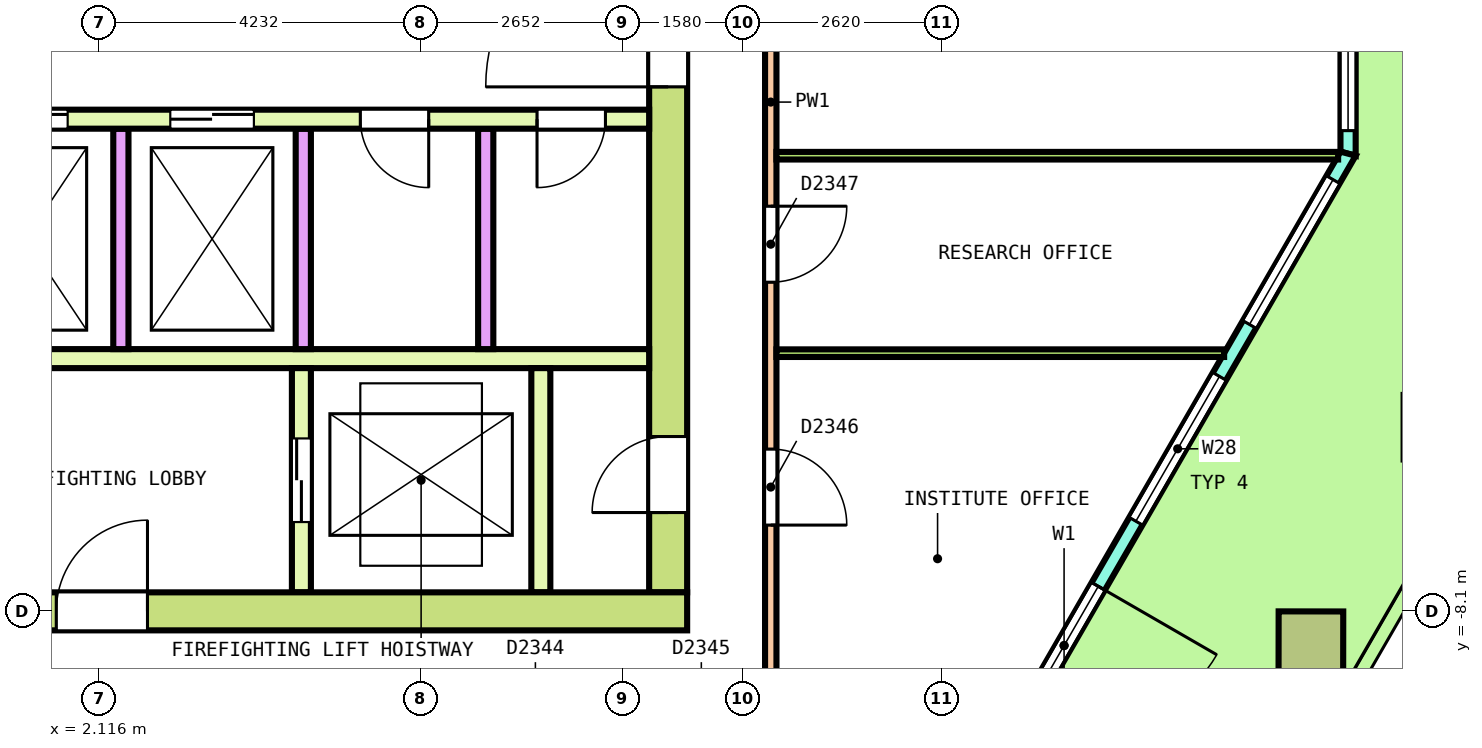
"""IFC4 building model, lengths in metres.
Left out: names, types, materials, properties, quantities, classifications, styles, units other than length and angle.
Written with IfcOpenShell. Run it as: python <this file> out.ifc"""

import sys

from ifc_helpers import new_model, si_unit, direction, frame, frame_2d, origin, origin_2d, place, context, subcontext, project, spatial, polyline, rectangle, outline, extrude, element, fill, save


model = new_model("IFC4")
c1 = context("Model", 3, precision=1e-05, world=origin(), true_north=direction((0.0, 1.0)))
c2 = subcontext(c1, "Body", "Model", "MODEL_VIEW")
j1 = project(units=[si_unit("LENGTHUNIT", "METRE"), si_unit("PLANEANGLEUNIT", "RADIAN")], contexts=[c1])
p1 = place(None, origin())
s1 = spatial("IfcSite", under=j1, at=p1, CompositionType="ELEMENT")
p2 = place(p1, origin())
s2 = spatial("IfcBuilding", under=s1, at=p2, CompositionType="ELEMENT")
p3 = place(p2, frame((0.0, 0.0, 320.6)))
s3 = spatial("IfcBuildingStorey", under=s2, at=p3, CompositionType="ELEMENT", Elevation=320.6)
p4 = place(p3, frame((18.056, -8.526, 0.0), z_axis=(0.003611943648, 0.006354345307, 0.999973287723), x_axis=(0.495427452012, 0.86861856765, -0.007309153601)))
e1 = element("IfcColumn", 1, at=p4, inside=s3, PredefinedType="COLUMN", context=c2, shape_type="SweptSolid", body=[
    extrude(rectangle(XDim=0.85, YDim=0.85, at=origin_2d()), origin(), (0.0, 0.0, 1.0), 3.65),
])
p5 = place(p3, frame((19.701, -5.677, 0.0), z_axis=(0.010900409442, 0.01892525075, 0.999761479533), x_axis=(0.49889855577, 0.866385160892, -0.021839964222)))
e2 = element("IfcColumn", 2, at=p5, inside=s3, PredefinedType="COLUMN", context=c2, shape_type="SweptSolid", body=[
    extrude(rectangle(XDim=0.85, YDim=0.85, at=origin_2d()), origin(), (0.0, 0.0, 1.0), 3.651),
])
p6 = place(p3, frame((18.545, -2.079, 0.0), z_axis=(0.0, 0.0, 1.0), x_axis=(0.0, 1.0, 0.0)))
e3 = element("IfcWall", 3, at=p6, inside=s3, PredefinedType="SOLIDWALL", context=c2, shape_type="SweptSolid", body=[
    extrude(outline(polyline([(-0.027, -0.1), (1.214, -0.1), (2.456, -0.1), (3.697, -0.1), (4.938, -0.1), (4.885, 0.1), (3.67, 0.1), (2.456, 0.1), (1.241, 0.1), (0.027, 0.1), (-0.027, -0.1)])), origin(), (0.0, 0.0, 1.0), 3.7),
])
p7 = place(p6, frame((0.303, 0.0, 0.1)))
e4 = element("IfcOpeningElement", 4, at=p7, cuts=e3, PredefinedType="OPENING", context=c2, shape_type="SweptSolid", body=[
    extrude(rectangle(XDim=1.85, YDim=2.9, at=frame_2d((0.925, 1.45))), frame((0.0, 0.11, 0.0), z_axis=(0.0, -1.0, 0.0), x_axis=(1.0, 0.0, 0.0)), (0.0, 0.0, 1.0), 0.22),
])
p8 = place(p6, frame((2.759, 0.0, 0.1)))
e5 = element("IfcOpeningElement", 5, at=p8, cuts=e3, PredefinedType="OPENING", context=c2, shape_type="SweptSolid", body=[
    extrude(rectangle(XDim=1.85, YDim=2.9, at=frame_2d((0.925, 1.45))), frame((0.0, 0.11, 0.0), z_axis=(0.0, -1.0, 0.0), x_axis=(1.0, 0.0, 0.0)), (0.0, 0.0, 1.0), 0.22),
])
p9 = place(p3, frame((11.073, -15.021, 0.0), z_axis=(0.0, 0.0, 1.0), x_axis=(0.499999144553, 0.866025897676, 0.0)))
e6 = element("IfcWall", 6, at=p9, inside=s3, PredefinedType="SOLIDWALL", context=c2, shape_type="SweptSolid", body=[
    extrude(outline(polyline([(-0.027, -0.1), (1.044, -0.1), (2.116, -0.1), (3.187, -0.1), (4.259, -0.1), (5.33, -0.1), (6.401, -0.1), (7.472, -0.1), (8.544, -0.1), (9.615, -0.1), (10.686, -0.1), (11.758, -0.1), (12.829, -0.1), (13.9, -0.1), (14.972, -0.1), (14.918, 0.1), (13.854, 0.1), (12.791, 0.1), (11.727, 0.1), (10.663, 0.1), (9.6, 0.1), (8.536, 0.1), (7.472, 0.1), (6.409, 0.1), (5.345, 0.1), (4.281, 0.1), (3.218, 0.1), (2.154, 0.1), (1.091, 0.1), (0.027, 0.1), (-0.027, -0.1)])), origin(), (0.0, 0.0, 1.0), 3.7),
])
p10 = place(p9, frame((0.395, 0.0, 0.1)))
e7 = element("IfcOpeningElement", 7, at=p10, cuts=e6, PredefinedType="OPENING", context=c2, shape_type="SweptSolid", body=[
    extrude(rectangle(XDim=2.2, YDim=2.9, at=frame_2d((1.1, 1.45))), frame((0.0, 0.11, 0.0), z_axis=(0.0, -1.0, 0.0), x_axis=(1.0, 0.0, 0.0)), (0.0, 0.0, 1.0), 0.22),
])
p11 = place(p9, frame((3.384, 0.0, 0.1)))
e8 = element("IfcOpeningElement", 8, at=p11, cuts=e6, PredefinedType="OPENING", context=c2, shape_type="SweptSolid", body=[
    extrude(rectangle(XDim=2.2, YDim=2.9, at=frame_2d((1.1, 1.45))), frame((0.0, 0.11, 0.0), z_axis=(0.0, -1.0, 0.0), x_axis=(1.0, 0.0, 0.0)), (0.0, 0.0, 1.0), 0.22),
])
p12 = place(p9, frame((6.573, 0.0, 0.0)))
e9 = element("IfcOpeningElement", 9, at=p12, cuts=e6, PredefinedType="OPENING", context=c2, shape_type="SweptSolid", body=[
    extrude(rectangle(XDim=1.8, YDim=2.4, at=frame_2d((0.9, 1.2))), frame((0.0, 0.11, 0.0), z_axis=(0.0, -1.0, 0.0), x_axis=(1.0, 0.0, 0.0)), (0.0, 0.0, 1.0), 0.22),
])
p13 = place(p9, frame((6.573, 0.0, 2.55)))
e10 = element("IfcOpeningElement", 10, at=p13, cuts=e6, PredefinedType="OPENING", context=c2, shape_type="SweptSolid", body=[
    extrude(rectangle(XDim=1.8, YDim=0.45, at=frame_2d((0.9, 0.225))), frame((0.0, 0.11, 0.0), z_axis=(0.0, -1.0, 0.0), x_axis=(1.0, 0.0, 0.0)), (0.0, 0.0, 1.0), 0.22),
])
p14 = place(p9, frame((9.361, 0.0, 0.1)))
e11 = element("IfcOpeningElement", 11, at=p14, cuts=e6, PredefinedType="OPENING", context=c2, shape_type="SweptSolid", body=[
    extrude(rectangle(XDim=2.2, YDim=2.9, at=frame_2d((1.1, 1.45))), frame((0.0, 0.11, 0.0), z_axis=(0.0, -1.0, 0.0), x_axis=(1.0, 0.0, 0.0)), (0.0, 0.0, 1.0), 0.22),
])
p15 = place(p9, frame((12.35, 0.0, 0.1)))
e12 = element("IfcOpeningElement", 12, at=p15, cuts=e6, PredefinedType="OPENING", context=c2, shape_type="SweptSolid", body=[
    extrude(rectangle(XDim=2.2, YDim=2.9, at=frame_2d((1.1, 1.45))), frame((0.0, 0.11, 0.0), z_axis=(0.0, -1.0, 0.0), x_axis=(1.0, 0.0, 0.0)), (0.0, 0.0, 1.0), 0.22),
])
p16 = place(p3, frame((-9.85, -8.1, 0.0), z_axis=(0.0, 0.0, 1.0), x_axis=(1.0, 0.0, 0.0)))
e13 = element("IfcWall", 13, at=p16, inside=s3, PredefinedType="SHEAR", context=c2, shape_type="SweptSolid", body=[
    extrude(rectangle(XDim=19.7, YDim=0.5, at=frame_2d((9.85, 0.0))), origin(), (0.0, 0.0, 1.0), 3.7),
])
p17 = place(p16, frame((11.4, 0.0, 0.0)))
e14 = element("IfcOpeningElement", 14, at=p17, cuts=e13, PredefinedType="OPENING", context=c2, shape_type="SweptSolid", body=[
    extrude(rectangle(XDim=1.2, YDim=2.1, at=frame_2d((0.6, 1.05))), frame((0.0, 0.26, 0.0), z_axis=(0.0, -1.0, 0.0), x_axis=(1.0, 0.0, 0.0)), (0.0, 0.0, 1.0), 0.52),
])
p18 = place(p3, frame((9.6, -7.85, 0.0), z_axis=(0.0, 0.0, 1.0), x_axis=(0.0, 1.0, 0.0)))
e15 = element("IfcWall", 15, at=p18, inside=s3, PredefinedType="SHEAR", context=c2, shape_type="SweptSolid", body=[
    extrude(rectangle(XDim=15.7, YDim=0.5, at=frame_2d((7.85, 0.0))), origin(), (0.0, 0.0, 1.0), 3.7),
])
p19 = place(p18, frame((6.65, 0.0, 0.0)))
e16 = element("IfcOpeningElement", 16, at=p19, cuts=e15, PredefinedType="OPENING", context=c2, shape_type="SweptSolid", body=[
    extrude(rectangle(XDim=2.4, YDim=2.1, at=frame_2d((1.2, 1.05))), frame((0.0, 0.26, 0.0), z_axis=(0.0, -1.0, 0.0), x_axis=(1.0, 0.0, 0.0)), (0.0, 0.0, 1.0), 0.52),
])
p20 = place(p18, frame((13.55, 0.0, 0.0)))
e17 = element("IfcOpeningElement", 17, at=p20, cuts=e15, PredefinedType="OPENING", context=c2, shape_type="SweptSolid", body=[
    extrude(rectangle(XDim=1.2, YDim=2.1, at=frame_2d((0.6, 1.05))), frame((0.0, 0.26, 0.0), z_axis=(0.0, -1.0, 0.0), x_axis=(1.0, 0.0, 0.0)), (0.0, 0.0, 1.0), 0.52),
])
p21 = place(p18, frame((1.05, 0.0, 0.0)))
e18 = element("IfcOpeningElement", 18, at=p21, cuts=e15, PredefinedType="OPENING", context=c2, shape_type="SweptSolid", body=[
    extrude(rectangle(XDim=1.0, YDim=2.1, at=frame_2d((0.5, 1.05))), frame((0.0, 0.26, 0.0), z_axis=(0.0, -1.0, 0.0), x_axis=(1.0, 0.0, 0.0)), (0.0, 0.0, 1.0), 0.52),
])
p22 = place(p3, frame((-9.35, -1.625, 0.0), z_axis=(0.0, 0.0, 1.0), x_axis=(1.0, 0.0, 0.0)))
e19 = element("IfcWall", 19, at=p22, inside=s3, PredefinedType="SOLIDWALL", context=c2, shape_type="SweptSolid", body=[
    extrude(rectangle(XDim=18.7, YDim=0.25, at=frame_2d((9.35, 0.0))), origin(), (0.0, 0.0, 1.0), 3.7),
])
p23 = place(p22, frame((7.65, 0.0, 0.0)))
e20 = element("IfcOpeningElement", 20, at=p23, cuts=e19, PredefinedType="OPENING", context=c2, shape_type="SweptSolid", body=[
    extrude(rectangle(XDim=1.1, YDim=2.1, at=frame_2d((0.55, 1.05))), frame((0.0, 0.135, 0.0), z_axis=(0.0, -1.0, 0.0), x_axis=(1.0, 0.0, 0.0)), (0.0, 0.0, 1.0), 0.27),
])
p24 = place(p22, frame((9.95, 0.0, 0.0)))
e21 = element("IfcOpeningElement", 21, at=p24, cuts=e19, PredefinedType="OPENING", context=c2, shape_type="SweptSolid", body=[
    extrude(rectangle(XDim=1.1, YDim=2.1, at=frame_2d((0.55, 1.05))), frame((0.0, 0.135, 0.0), z_axis=(0.0, -1.0, 0.0), x_axis=(1.0, 0.0, 0.0)), (0.0, 0.0, 1.0), 0.27),
])
p25 = place(p22, frame((12.4, 0.0, 0.0)))
e22 = element("IfcOpeningElement", 22, at=p25, cuts=e19, PredefinedType="OPENING", context=c2, shape_type="SweptSolid", body=[
    extrude(rectangle(XDim=1.1, YDim=2.1, at=frame_2d((0.55, 1.05))), frame((0.0, 0.135, 0.0), z_axis=(0.0, -1.0, 0.0), x_axis=(1.0, 0.0, 0.0)), (0.0, 0.0, 1.0), 0.27),
])
p26 = place(p22, frame((0.575, 0.0, 0.0)))
e23 = element("IfcOpeningElement", 23, at=p26, cuts=e19, PredefinedType="OPENING", context=c2, shape_type="SweptSolid", body=[
    extrude(rectangle(XDim=0.9, YDim=2.1, at=frame_2d((0.45, 1.05))), frame((0.0, 0.135, 0.0), z_axis=(0.0, -1.0, 0.0), x_axis=(1.0, 0.0, 0.0)), (0.0, 0.0, 1.0), 0.27),
])
p27 = place(p22, frame((2.519, 0.0, 0.0)))
e24 = element("IfcOpeningElement", 24, at=p27, cuts=e19, PredefinedType="OPENING", context=c2, shape_type="SweptSolid", body=[
    extrude(rectangle(XDim=0.9, YDim=2.1, at=frame_2d((0.45, 1.05))), frame((0.0, 0.135, 0.0), z_axis=(0.0, -1.0, 0.0), x_axis=(1.0, 0.0, 0.0)), (0.0, 0.0, 1.0), 0.27),
])
p28 = place(p22, frame((4.881, 0.0, 0.0)))
e25 = element("IfcOpeningElement", 25, at=p28, cuts=e19, PredefinedType="OPENING", context=c2, shape_type="SweptSolid", body=[
    extrude(rectangle(XDim=0.9, YDim=2.1, at=frame_2d((0.45, 1.05))), frame((0.0, 0.135, 0.0), z_axis=(0.0, -1.0, 0.0), x_axis=(1.0, 0.0, 0.0)), (0.0, 0.0, 1.0), 0.27),
])
p29 = place(p22, frame((14.9, 0.0, 0.0)))
e26 = element("IfcOpeningElement", 26, at=p29, cuts=e19, PredefinedType="OPENING", context=c2, shape_type="SweptSolid", body=[
    extrude(rectangle(XDim=0.9, YDim=2.1, at=frame_2d((0.45, 1.05))), frame((0.0, 0.135, 0.0), z_axis=(0.0, -1.0, 0.0), x_axis=(1.0, 0.0, 0.0)), (0.0, 0.0, 1.0), 0.27),
])
p30 = place(p22, frame((17.225, 0.0, 0.0)))
e27 = element("IfcOpeningElement", 27, at=p30, cuts=e19, PredefinedType="OPENING", context=c2, shape_type="SweptSolid", body=[
    extrude(rectangle(XDim=0.9, YDim=2.1, at=frame_2d((0.45, 1.05))), frame((0.0, 0.135, 0.0), z_axis=(0.0, -1.0, 0.0), x_axis=(1.0, 0.0, 0.0)), (0.0, 0.0, 1.0), 0.27),
])
p31 = place(p3, frame((-9.35, -4.775, 0.0), z_axis=(0.0, 0.0, 1.0), x_axis=(1.0, 0.0, 0.0)))
e28 = element("IfcWall", 28, at=p31, inside=s3, PredefinedType="SOLIDWALL", context=c2, shape_type="SweptSolid", body=[
    extrude(rectangle(XDim=18.7, YDim=0.25, at=frame_2d((9.35, 0.0))), origin(), (0.0, 0.0, 1.0), 3.7),
])
for number, where, z_axis, x_axis in (
    (29, (2.4, -4.65, 0.0), (0.0, 0.0, 1.0), (0.0, 1.0, 0.0)),
    (30, (4.8, -4.65, 0.0), (0.0, 0.0, 1.0), (0.0, 1.0, 0.0)),
    (31, (7.2, -4.65, 0.0), (0.0, 0.0, 1.0), (0.0, 1.0, 0.0)),
):
    element("IfcWall", number, at=place(p3, frame(where, z_axis=z_axis, x_axis=x_axis)), inside=s3, PredefinedType="SOLIDWALL", context=c2, shape_type="SweptSolid", body=[
        extrude(rectangle(XDim=2.9, YDim=0.2, at=frame_2d((1.45, 0.0))), origin(), (0.0, 0.0, 1.0), 3.7),
    ])
p32 = place(p3, frame((4.775, -7.85, 0.0), z_axis=(0.0, 0.0, 1.0), x_axis=(0.0, 1.0, 0.0)))
e32 = element("IfcWall", 32, at=p32, inside=s3, PredefinedType="SOLIDWALL", context=c2, shape_type="SweptSolid", body=[
    extrude(rectangle(XDim=2.95, YDim=0.25, at=frame_2d((1.475, 0.0))), origin(), (0.0, 0.0, 1.0), 3.7),
])
p33 = place(p32, frame((0.925, 0.0, 0.0)))
e33 = element("IfcOpeningElement", 33, at=p33, cuts=e32, PredefinedType="OPENING", context=c2, shape_type="SweptSolid", body=[
    extrude(rectangle(XDim=1.1, YDim=2.1, at=frame_2d((0.55, 1.05))), frame((0.0, 0.135, 0.0), z_axis=(0.0, -1.0, 0.0), x_axis=(1.0, 0.0, 0.0)), (0.0, 0.0, 1.0), 0.27),
])
p34 = place(p3, frame((7.925, -7.85, 0.0), z_axis=(0.0, 0.0, 1.0), x_axis=(0.0, 1.0, 0.0)))
e34 = element("IfcWall", 34, at=p34, inside=s3, PredefinedType="SOLIDWALL", context=c2, shape_type="SweptSolid", body=[
    extrude(rectangle(XDim=2.95, YDim=0.25, at=frame_2d((1.475, 0.0))), origin(), (0.0, 0.0, 1.0), 3.7),
])
p35 = place(p3, frame((10.95, -9.975, 0.0), z_axis=(0.0, 0.0, 1.0), x_axis=(0.0, 1.0, 0.0)))
e35 = element("IfcWall", 35, at=p35, inside=s3, PredefinedType="PARTITIONING", context=c2, shape_type="SweptSolid", body=[
    extrude(rectangle(XDim=17.15, YDim=0.15, at=frame_2d((8.575, 0.0))), origin(), (0.0, 0.0, 1.0), 3.05),
])
p36 = place(p35, frame((10.342, 0.0, 0.0)))
e36 = element("IfcOpeningElement", 36, at=p36, cuts=e35, PredefinedType="OPENING", context=c2, shape_type="SweptSolid", body=[
    extrude(rectangle(XDim=1.0, YDim=2.1, at=frame_2d((0.5, 1.05))), frame((0.0, 0.085, 0.0), z_axis=(0.0, -1.0, 0.0), x_axis=(1.0, 0.0, 0.0)), (0.0, 0.0, 1.0), 0.17),
])
p37 = place(p35, frame((3.01, 0.0, 0.0)))
e37 = element("IfcOpeningElement", 37, at=p37, cuts=e35, PredefinedType="OPENING", context=c2, shape_type="SweptSolid", body=[
    extrude(rectangle(XDim=1.0, YDim=2.1, at=frame_2d((0.5, 1.05))), frame((0.0, 0.085, 0.0), z_axis=(0.0, -1.0, 0.0), x_axis=(1.0, 0.0, 0.0)), (0.0, 0.0, 1.0), 0.17),
])
p38 = place(p35, frame((6.205, 0.0, 0.0)))
e38 = element("IfcOpeningElement", 38, at=p38, cuts=e35, PredefinedType="OPENING", context=c2, shape_type="SweptSolid", body=[
    extrude(rectangle(XDim=1.0, YDim=2.1, at=frame_2d((0.5, 1.05))), frame((0.0, 0.085, 0.0), z_axis=(0.0, -1.0, 0.0), x_axis=(1.0, 0.0, 0.0)), (0.0, 0.0, 1.0), 0.17),
])
p39 = place(p3, frame((11.025, -2.105, 0.0), z_axis=(0.0, 0.0, 1.0), x_axis=(1.0, 0.0, 0.0)))
e39 = element("IfcWall", 39, at=p39, inside=s3, PredefinedType="PARTITIONING", context=c2, shape_type="SweptSolid", body=[
    extrude(rectangle(XDim=7.389, YDim=0.1, at=frame_2d((3.695, 0.0))), origin(), (0.0, 0.0, 1.0), 3.05),
])
p40 = place(p3, frame((11.025, -4.703, 0.0), z_axis=(0.0, 0.0, 1.0), x_axis=(1.0, 0.0, 0.0)))
e40 = element("IfcWall", 40, at=p40, inside=s3, PredefinedType="PARTITIONING", context=c2, shape_type="SweptSolid", body=[
    extrude(rectangle(XDim=5.89, YDim=0.1, at=frame_2d((2.945, 0.0))), origin(), (0.0, 0.0, 1.0), 3.05),
])
p41 = place(p7, origin())
e41 = element("IfcWindow", 41, at=p41, inside=s3, PartitioningType="SINGLE_PANEL", PredefinedType="WINDOW", context=c2, shape_type="SweptSolid", body=[
    extrude(rectangle(XDim=1.85, YDim=2.9, at=frame_2d((0.925, 1.45))), frame((0.0, 0.03, 0.0), z_axis=(0.0, -1.0, 0.0), x_axis=(1.0, 0.0, 0.0)), (0.0, 0.0, 1.0), 0.06),
])
fill(e4, e41)
p42 = place(p12, origin())
e42 = element("IfcDoor", 42, at=p42, inside=s3, OperationType="DOUBLE_DOOR_SINGLE_SWING", PredefinedType="DOOR", context=c2, shape_type="SweptSolid", body=[
    extrude(rectangle(XDim=1.8, YDim=2.4, at=frame_2d((0.9, 1.2))), frame((0.0, 0.025, 0.0), z_axis=(0.0, -1.0, 0.0), x_axis=(1.0, 0.0, 0.0)), (0.0, 0.0, 1.0), 0.05),
])
fill(e9, e42)
p43 = place(p13, origin())
e43 = element("IfcWindow", 43, at=p43, inside=s3, PartitioningType="SINGLE_PANEL", PredefinedType="WINDOW", context=c2, shape_type="SweptSolid", body=[
    extrude(rectangle(XDim=1.8, YDim=0.45, at=frame_2d((0.9, 0.225))), frame((0.0, 0.03, 0.0), z_axis=(0.0, -1.0, 0.0), x_axis=(1.0, 0.0, 0.0)), (0.0, 0.0, 1.0), 0.06),
])
fill(e10, e43)
p44 = place(p14, origin())
e44 = element("IfcWindow", 44, at=p44, inside=s3, PartitioningType="SINGLE_PANEL", PredefinedType="WINDOW", context=c2, shape_type="SweptSolid", body=[
    extrude(rectangle(XDim=2.2, YDim=2.9, at=frame_2d((1.1, 1.45))), frame((0.0, 0.03, 0.0), z_axis=(0.0, -1.0, 0.0), x_axis=(1.0, 0.0, 0.0)), (0.0, 0.0, 1.0), 0.06),
])
fill(e11, e44)
p45 = place(p15, origin())
e45 = element("IfcWindow", 45, at=p45, inside=s3, PartitioningType="SINGLE_PANEL", PredefinedType="WINDOW", context=c2, shape_type="SweptSolid", body=[
    extrude(rectangle(XDim=2.2, YDim=2.9, at=frame_2d((1.1, 1.45))), frame((0.0, 0.03, 0.0), z_axis=(0.0, -1.0, 0.0), x_axis=(1.0, 0.0, 0.0)), (0.0, 0.0, 1.0), 0.06),
])
fill(e12, e45)
p46 = place(p24, origin())
e46 = element("IfcDoor", 46, at=p46, inside=s3, OperationType="DOUBLE_DOOR_SLIDING", PredefinedType="DOOR", context=c2, shape_type="SweptSolid", body=[
    extrude(rectangle(XDim=1.1, YDim=2.1, at=frame_2d((0.55, 1.05))), frame((0.0, 0.075, 0.0), z_axis=(0.0, -1.0, 0.0), x_axis=(1.0, 0.0, 0.0)), (0.0, 0.0, 1.0), 0.15),
])
fill(e21, e46)
p47 = place(p25, origin())
e47 = element("IfcDoor", 47, at=p47, inside=s3, OperationType="DOUBLE_DOOR_SLIDING", PredefinedType="DOOR", context=c2, shape_type="SweptSolid", body=[
    extrude(rectangle(XDim=1.1, YDim=2.1, at=frame_2d((0.55, 1.05))), frame((0.0, 0.075, 0.0), z_axis=(0.0, -1.0, 0.0), x_axis=(1.0, 0.0, 0.0)), (0.0, 0.0, 1.0), 0.15),
])
fill(e22, e47)
p48 = place(p33, origin())
e48 = element("IfcDoor", 48, at=p48, inside=s3, OperationType="DOUBLE_DOOR_SLIDING", PredefinedType="DOOR", context=c2, shape_type="SweptSolid", body=[
    extrude(rectangle(XDim=1.1, YDim=2.1, at=frame_2d((0.55, 1.05))), frame((0.0, 0.075, 0.0), z_axis=(0.0, -1.0, 0.0), x_axis=(1.0, 0.0, 0.0)), (0.0, 0.0, 1.0), 0.15),
])
fill(e33, e48)
p49 = place(p19, origin())
e49 = element("IfcDoor", 49, at=p49, inside=s3, OperationType="DOUBLE_DOOR_SINGLE_SWING", PredefinedType="DOOR", context=c2, shape_type="SweptSolid", body=[
    extrude(rectangle(XDim=2.4, YDim=2.1, at=frame_2d((1.2, 1.05))), frame((0.0, 0.2, 0.0), z_axis=(0.0, -1.0, 0.0), x_axis=(1.0, 0.0, 0.0)), (0.0, 0.0, 1.0), 0.4),
])
fill(e16, e49)
p50 = place(p17, origin())
e50 = element("IfcDoor", 50, at=p50, inside=s3, OperationType="SINGLE_SWING_LEFT", PredefinedType="DOOR", context=c2, shape_type="SweptSolid", body=[
    extrude(rectangle(XDim=1.2, YDim=2.1, at=frame_2d((0.6, 1.05))), frame((0.0, 0.2, 0.0), z_axis=(0.0, -1.0, 0.0), x_axis=(1.0, 0.0, 0.0)), (0.0, 0.0, 1.0), 0.4),
])
fill(e14, e50)
p51 = place(p21, origin())
e51 = element("IfcDoor", 51, at=p51, inside=s3, OperationType="SINGLE_SWING_LEFT", PredefinedType="DOOR", context=c2, shape_type="SweptSolid", body=[
    extrude(rectangle(XDim=1.0, YDim=2.1, at=frame_2d((0.5, 1.05))), frame((0.0, 0.2, 0.0), z_axis=(0.0, -1.0, 0.0), x_axis=(1.0, 0.0, 0.0)), (0.0, 0.0, 1.0), 0.4),
])
fill(e18, e51)
p52 = place(p29, origin())
e52 = element("IfcDoor", 52, at=p52, inside=s3, OperationType="SINGLE_SWING_RIGHT", PredefinedType="DOOR", context=c2, shape_type="SweptSolid", body=[
    extrude(rectangle(XDim=0.9, YDim=2.1, at=frame_2d((0.45, 1.05))), frame((0.0, 0.075, 0.0), z_axis=(0.0, -1.0, 0.0), x_axis=(1.0, 0.0, 0.0)), (0.0, 0.0, 1.0), 0.15),
])
fill(e26, e52)
p53 = place(p30, origin())
e53 = element("IfcDoor", 53, at=p53, inside=s3, OperationType="SINGLE_SWING_LEFT", PredefinedType="DOOR", context=c2, shape_type="SweptSolid", body=[
    extrude(rectangle(XDim=0.9, YDim=2.1, at=frame_2d((0.45, 1.05))), frame((0.0, 0.075, 0.0), z_axis=(0.0, -1.0, 0.0), x_axis=(1.0, 0.0, 0.0)), (0.0, 0.0, 1.0), 0.15),
])
fill(e27, e53)
p54 = place(p37, origin())
e54 = element("IfcDoor", 54, at=p54, inside=s3, OperationType="SINGLE_SWING_RIGHT", PredefinedType="DOOR", context=c2, shape_type="SweptSolid", body=[
    extrude(rectangle(XDim=1.0, YDim=2.1, at=frame_2d((0.5, 1.05))), frame((0.0, 0.025, 0.0), z_axis=(0.0, -1.0, 0.0), x_axis=(1.0, 0.0, 0.0)), (0.0, 0.0, 1.0), 0.05),
])
fill(e37, e54)
p55 = place(p38, origin())
e55 = element("IfcDoor", 55, at=p55, inside=s3, OperationType="SINGLE_SWING_LEFT", PredefinedType="DOOR", context=c2, shape_type="SweptSolid", body=[
    extrude(rectangle(XDim=1.0, YDim=2.1, at=frame_2d((0.5, 1.05))), frame((0.0, 0.025, 0.0), z_axis=(0.0, -1.0, 0.0), x_axis=(1.0, 0.0, 0.0)), (0.0, 0.0, 1.0), 0.05),
])
fill(e38, e55)
save(model, sys.argv[1])
